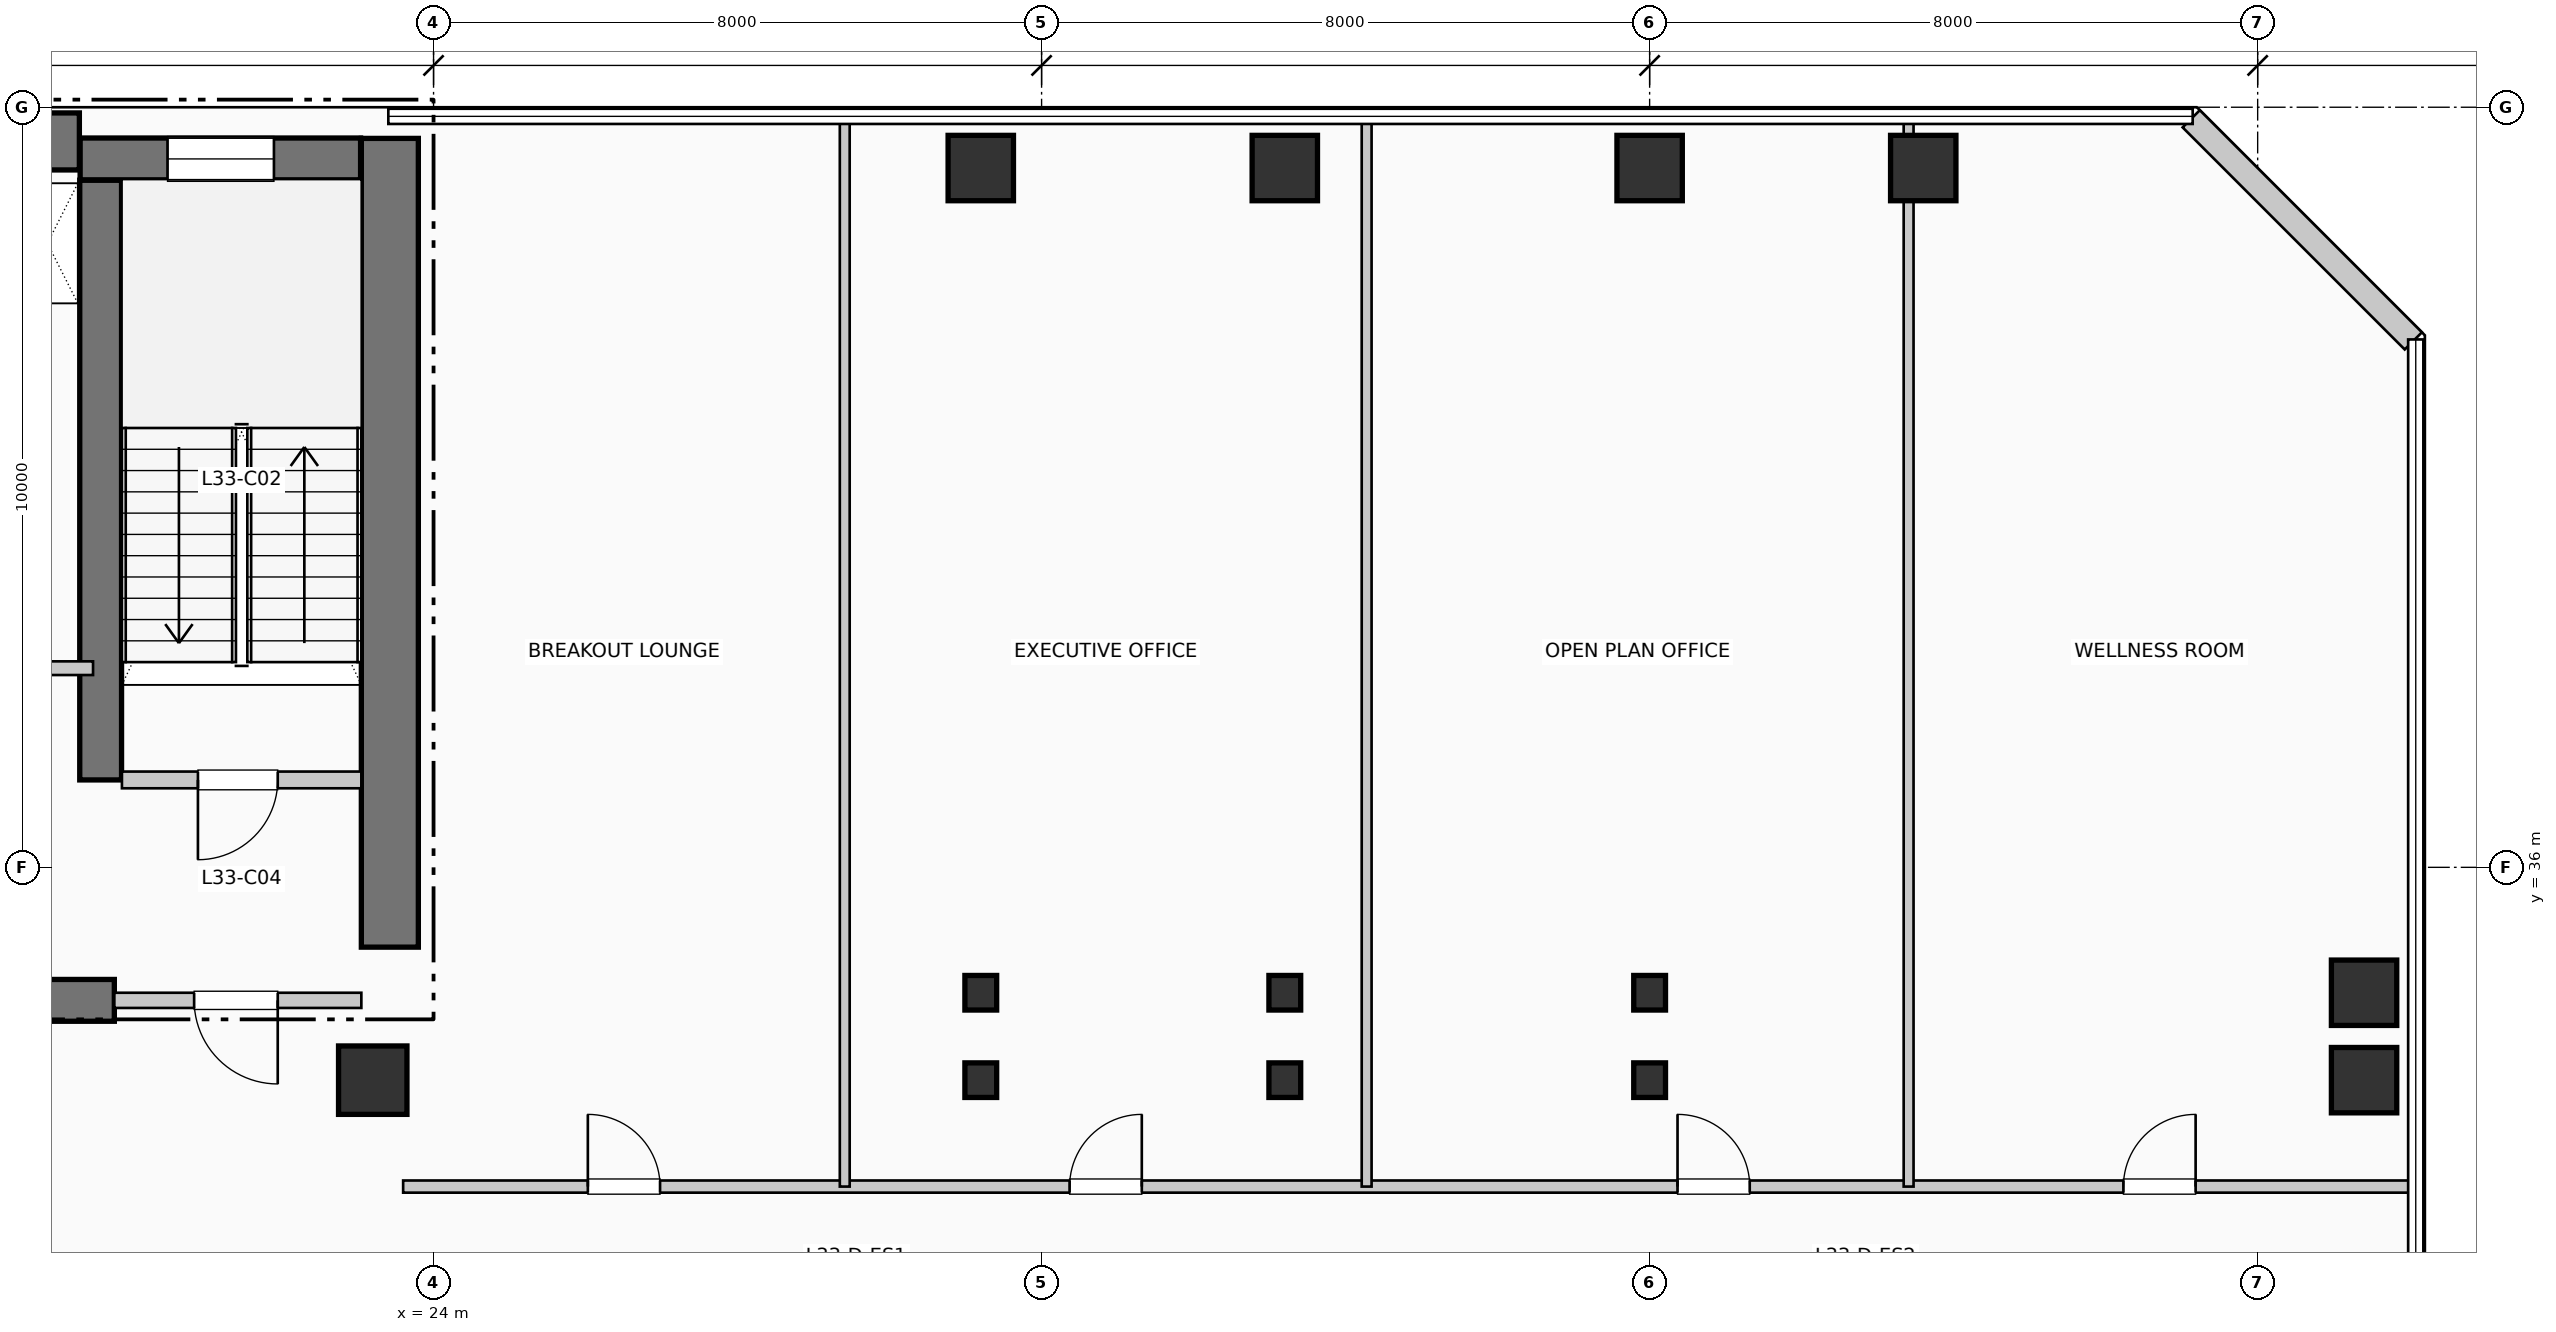
"""IFC4 building model, lengths in metres.
Left out: names, types, materials, properties, quantities, classifications, styles, units other than length and angle.
Written with IfcOpenShell. Run it as: python <this file> out.ifc"""

import sys

from ifc_helpers import new_model, si_unit, direction, frame, frame_2d, origin, origin_2d, place, context, subcontext, project, spatial, rectangle, i_section, extrude, element, fill, save


model = new_model("IFC4")
c1 = context("Model", 3, precision=1e-05, world=origin(), true_north=direction((0.0, 1.0)))
c2 = subcontext(c1, "Body", "Model", "MODEL_VIEW")
j1 = project(units=[si_unit("LENGTHUNIT", "METRE"), si_unit("PLANEANGLEUNIT", "RADIAN")], contexts=[c1])
p1 = place(None, origin())
s1 = spatial("IfcSite", under=j1, at=p1, CompositionType="ELEMENT")
p2 = place(p1, origin())
s2 = spatial("IfcBuilding", under=s1, at=p2, CompositionType="ELEMENT")
p3 = place(p2, frame((0.0, 0.0, 138.93)))
s3 = spatial("IfcBuildingStorey", under=s2, at=p3, CompositionType="ELEMENT", Elevation=138.93)
p4 = place(p3, frame((5.36, 45.55, 0.0), z_axis=(0.0, 0.0, 1.0), x_axis=(1.0, 0.0, 0.0)))
e1 = element("IfcWall", 1, at=p4, inside=s3, PredefinedType="SHEAR", context=c2, shape_type="SweptSolid", body=[
    extrude(rectangle(XDim=13.98, YDim=0.75, at=frame_2d((6.99, 0.0))), origin(), (0.0, 0.0, 1.0), 3.96),
])
p5 = place(p3, frame((23.425, 34.95, 0.0), z_axis=(0.0, 0.0, 1.0), x_axis=(0.0, 1.0, 0.0)))
e2 = element("IfcWall", 2, at=p5, inside=s3, PredefinedType="SHEAR", context=c2, shape_type="SweptSolid", body=[
    extrude(rectangle(XDim=10.64, YDim=0.75, at=frame_2d((5.32, 0.0))), origin(), (0.0, 0.0, 1.0), 3.96),
])
p6 = place(p3, frame((13.68, 34.25, 0.0), z_axis=(0.0, 0.0, 1.0), x_axis=(1.0, 0.0, 0.0)))
e3 = element("IfcWall", 3, at=p6, inside=s3, PredefinedType="SHEAR", context=c2, shape_type="SweptSolid", body=[
    extrude(rectangle(XDim=6.12, YDim=0.55, at=frame_2d((3.06, 0.0))), origin(), (0.0, 0.0, 1.0), 3.96),
])
p7 = place(p3, frame((19.62, 37.15, 0.0), z_axis=(0.0, 0.0, 1.0), x_axis=(0.0, 1.0, 0.0)))
e4 = element("IfcWall", 4, at=p7, inside=s3, PredefinedType="SHEAR", context=c2, shape_type="SweptSolid", body=[
    extrude(rectangle(XDim=7.89, YDim=0.55, at=frame_2d((3.945, 0.0))), origin(), (0.0, 0.0, 1.0), 3.96),
])
p8 = place(p3, frame((19.35, 45.32, 0.0), z_axis=(0.0, 0.0, 1.0), x_axis=(1.0, 0.0, 0.0)))
e5 = element("IfcWall", 5, at=p8, inside=s3, PredefinedType="SHEAR", context=c2, shape_type="SweptSolid", body=[
    extrude(rectangle(XDim=3.69, YDim=0.55, at=frame_2d((1.845, 0.0))), origin(), (0.0, 0.0, 1.0), 3.96),
])
p9 = place(p8, frame((1.15, 0.0, 1.05)))
e6 = element("IfcOpeningElement", 6, at=p9, cuts=e5, PredefinedType="OPENING", context=c2, shape_type="SweptSolid", body=[
    extrude(rectangle(XDim=1.4, YDim=1.8, at=frame_2d((0.7, 0.9))), frame((0.0, 0.285, 0.0), z_axis=(0.0, -1.0, 0.0), x_axis=(1.0, 0.0, 0.0)), (0.0, 0.0, 1.0), 0.57),
])
p10 = place(p3, frame((23.2, 33.2, 0.0), z_axis=(0.0, 0.0, 1.0), x_axis=(1.0, 0.0, 0.0)))
e7 = element("IfcColumn", 7, at=p10, inside=s3, PredefinedType="COLUMN", context=c2, shape_type="SweptSolid", body=[
    extrude(rectangle(XDim=0.9, YDim=0.9, at=origin_2d()), origin(), (0.0, 0.0, 1.0), 3.96),
])
for number, where, z_axis, x_axis in (
    (8, (31.2, 33.2, 0.0), (0.0, 0.0, 1.0), (1.0, 0.0, 0.0)),
    (9, (31.2, 34.35, 0.0), (0.0, 0.0, 1.0), (1.0, 0.0, 0.0)),
):
    element("IfcColumn", number, at=place(p3, frame(where, z_axis=z_axis, x_axis=x_axis)), inside=s3, PredefinedType="COLUMN", context=c2, shape_type="SweptSolid", body=[
        extrude(i_section(OverallWidth=0.418, OverallDepth=0.455, WebThickness=0.032, FlangeThickness=0.051, at=origin_2d()), origin(), (0.0, 0.0, 1.0), 3.96),
    ])
p11 = place(p3, frame((31.2, 45.2, 0.0), z_axis=(0.0, 0.0, 1.0), x_axis=(1.0, 0.0, 0.0)))
e10 = element("IfcColumn", 10, at=p11, inside=s3, PredefinedType="COLUMN", context=c2, shape_type="SweptSolid", body=[
    extrude(rectangle(XDim=0.86, YDim=0.86, at=origin_2d()), origin(), (0.0, 0.0, 1.0), 3.96),
])
for number, where, z_axis, x_axis in (
    (11, (35.2, 33.2, 0.0), (0.0, 0.0, 1.0), (1.0, 0.0, 0.0)),
    (12, (35.2, 34.35, 0.0), (0.0, 0.0, 1.0), (1.0, 0.0, 0.0)),
):
    element("IfcColumn", number, at=place(p3, frame(where, z_axis=z_axis, x_axis=x_axis)), inside=s3, PredefinedType="COLUMN", context=c2, shape_type="SweptSolid", body=[
        extrude(i_section(OverallWidth=0.418, OverallDepth=0.455, WebThickness=0.032, FlangeThickness=0.051, at=origin_2d()), origin(), (0.0, 0.0, 1.0), 3.96),
    ])
p12 = place(p3, frame((35.2, 45.2, 0.0), z_axis=(0.0, 0.0, 1.0), x_axis=(1.0, 0.0, 0.0)))
e13 = element("IfcColumn", 13, at=p12, inside=s3, PredefinedType="COLUMN", context=c2, shape_type="SweptSolid", body=[
    extrude(rectangle(XDim=0.86, YDim=0.86, at=origin_2d()), origin(), (0.0, 0.0, 1.0), 3.96),
])
for number, where, z_axis, x_axis in (
    (14, (40.0, 33.2, 0.0), (0.0, 0.0, 1.0), (1.0, 0.0, 0.0)),
    (15, (40.0, 34.35, 0.0), (0.0, 0.0, 1.0), (1.0, 0.0, 0.0)),
):
    element("IfcColumn", number, at=place(p3, frame(where, z_axis=z_axis, x_axis=x_axis)), inside=s3, PredefinedType="COLUMN", context=c2, shape_type="SweptSolid", body=[
        extrude(i_section(OverallWidth=0.418, OverallDepth=0.455, WebThickness=0.032, FlangeThickness=0.051, at=origin_2d()), origin(), (0.0, 0.0, 1.0), 3.96),
    ])
for number, where, z_axis, x_axis in (
    (16, (40.0, 45.2, 0.0), (0.0, 0.0, 1.0), (1.0, 0.0, 0.0)),
    (17, (43.6, 45.2, 0.0), (0.0, 0.0, 1.0), (1.0, 0.0, 0.0)),
    (18, (49.4, 33.2, 0.0), (0.0, 0.0, 1.0), (1.0, 0.0, 0.0)),
    (19, (49.4, 34.35, 0.0), (0.0, 0.0, 1.0), (1.0, 0.0, 0.0)),
):
    element("IfcColumn", number, at=place(p3, frame(where, z_axis=z_axis, x_axis=x_axis)), inside=s3, PredefinedType="COLUMN", context=c2, shape_type="SweptSolid", body=[
        extrude(rectangle(XDim=0.86, YDim=0.86, at=origin_2d()), origin(), (0.0, 0.0, 1.0), 3.96),
    ])
p13 = place(p3, frame((50.048, 42.926, 0.0), z_axis=(0.0, 0.0, 1.0), x_axis=(-0.707136318428, 0.707077242712, 0.0)))
e20 = element("IfcWall", 20, at=p13, inside=s3, PredefinedType="SOLIDWALL", context=c2, shape_type="SweptSolid", body=[
    extrude(rectangle(XDim=4.133, YDim=0.32, at=frame_2d((2.066, 0.0))), origin(), (0.0, 0.0, 1.0), 3.71),
])
p14 = place(p3, frame((19.9, 37.15, 0.0), z_axis=(0.0, 0.0, 1.0), x_axis=(1.0, 0.0, 0.0)))
e21 = element("IfcWall", 21, at=p14, inside=s3, PredefinedType="PARTITIONING", context=c2, shape_type="SweptSolid", body=[
    extrude(rectangle(XDim=3.15, YDim=0.22, at=frame_2d((1.575, 0.0))), origin(), (0.0, 0.0, 1.0), 3.71),
])
p15 = place(p14, frame((2.05, 0.0, 0.0), z_axis=(0.0, 0.0, 1.0), x_axis=(-1.0, 0.0, 0.0)))
e22 = element("IfcOpeningElement", 22, at=p15, cuts=e21, PredefinedType="OPENING", context=c2, shape_type="SweptSolid", body=[
    extrude(rectangle(XDim=1.05, YDim=2.15, at=frame_2d((0.525, 1.075))), frame((0.0, 0.12, 0.0), z_axis=(0.0, -1.0, 0.0), x_axis=(1.0, 0.0, 0.0)), (0.0, 0.0, 1.0), 0.24),
])
p16 = place(p3, frame((19.8, 34.25, 0.0), z_axis=(0.0, 0.0, 1.0), x_axis=(1.0, 0.0, 0.0)))
e23 = element("IfcWall", 23, at=p16, inside=s3, PredefinedType="PARTITIONING", context=c2, shape_type="SweptSolid", body=[
    extrude(rectangle(XDim=3.25, YDim=0.2, at=frame_2d((1.625, 0.0))), origin(), (0.0, 0.0, 1.0), 3.71),
])
p17 = place(p16, frame((2.15, 0.0, 0.0), z_axis=(0.0, 0.0, 1.0), x_axis=(-1.0, 0.0, 0.0)))
e24 = element("IfcOpeningElement", 24, at=p17, cuts=e23, PredefinedType="OPENING", context=c2, shape_type="SweptSolid", body=[
    extrude(rectangle(XDim=1.1, YDim=2.15, at=frame_2d((0.55, 1.075))), frame((0.0, 0.11, 0.0), z_axis=(0.0, -1.0, 0.0), x_axis=(1.0, 0.0, 0.0)), (0.0, 0.0, 1.0), 0.22),
])
p18 = place(p3, frame((17.68, 38.62, 0.0), z_axis=(0.0, 0.0, 1.0), x_axis=(1.0, 0.0, 0.0)))
e25 = element("IfcWall", 25, at=p18, inside=s3, PredefinedType="PARTITIONING", context=c2, shape_type="SweptSolid", body=[
    extrude(rectangle(XDim=1.84, YDim=0.18, at=frame_2d((0.92, 0.0))), origin(), (0.0, 0.0, 1.0), 3.71),
])
p19 = place(p18, frame((0.24, 0.0, 0.0)))
e26 = element("IfcOpeningElement", 26, at=p19, cuts=e25, PredefinedType="OPENING", context=c2, shape_type="SweptSolid", body=[
    extrude(rectangle(XDim=0.92, YDim=2.1, at=frame_2d((0.46, 1.05))), frame((0.0, 0.1, 0.0), z_axis=(0.0, -1.0, 0.0), x_axis=(1.0, 0.0, 0.0)), (0.0, 0.0, 1.0), 0.2),
])
p20 = place(p3, frame((23.6, 31.8, 0.0), z_axis=(0.0, 0.0, 1.0), x_axis=(1.0, 0.0, 0.0)))
e27 = element("IfcWall", 27, at=p20, inside=s3, PredefinedType="PARTITIONING", context=c2, shape_type="SweptSolid", body=[
    extrude(rectangle(XDim=26.41, YDim=0.16, at=frame_2d((13.205, 0.0))), origin(), (0.0, 0.0, 1.0), 3.71),
])
p21 = place(p20, frame((2.43, 0.0, 0.0)))
e28 = element("IfcOpeningElement", 28, at=p21, cuts=e27, PredefinedType="OPENING", context=c2, shape_type="SweptSolid", body=[
    extrude(rectangle(XDim=0.95, YDim=2.15, at=frame_2d((0.475, 1.075))), frame((0.0, 0.09, 0.0), z_axis=(0.0, -1.0, 0.0), x_axis=(1.0, 0.0, 0.0)), (0.0, 0.0, 1.0), 0.18),
])
p22 = place(p20, frame((8.769, 0.0, 0.0)))
e29 = element("IfcOpeningElement", 29, at=p22, cuts=e27, PredefinedType="OPENING", context=c2, shape_type="SweptSolid", body=[
    extrude(rectangle(XDim=0.95, YDim=2.15, at=frame_2d((0.475, 1.075))), frame((0.0, 0.09, 0.0), z_axis=(0.0, -1.0, 0.0), x_axis=(1.0, 0.0, 0.0)), (0.0, 0.0, 1.0), 0.18),
])
p23 = place(p20, frame((16.767, 0.0, 0.0)))
e30 = element("IfcOpeningElement", 30, at=p23, cuts=e27, PredefinedType="OPENING", context=c2, shape_type="SweptSolid", body=[
    extrude(rectangle(XDim=0.95, YDim=2.15, at=frame_2d((0.475, 1.075))), frame((0.0, 0.09, 0.0), z_axis=(0.0, -1.0, 0.0), x_axis=(1.0, 0.0, 0.0)), (0.0, 0.0, 1.0), 0.18),
])
p24 = place(p20, frame((22.634, 0.0, 0.0)))
e31 = element("IfcOpeningElement", 31, at=p24, cuts=e27, PredefinedType="OPENING", context=c2, shape_type="SweptSolid", body=[
    extrude(rectangle(XDim=0.95, YDim=2.15, at=frame_2d((0.475, 1.075))), frame((0.0, 0.09, 0.0), z_axis=(0.0, -1.0, 0.0), x_axis=(1.0, 0.0, 0.0)), (0.0, 0.0, 1.0), 0.18),
])
for number, where, z_axis, x_axis in (
    (32, (29.41, 31.8, 0.0), (0.0, 0.0, 1.0), (0.0, 1.0, 0.0)),
    (33, (36.277, 31.8, 0.0), (0.0, 0.0, 1.0), (0.0, 1.0, 0.0)),
    (34, (43.407, 31.8, 0.0), (0.0, 0.0, 1.0), (0.0, 1.0, 0.0)),
):
    element("IfcWall", number, at=place(p3, frame(where, z_axis=z_axis, x_axis=x_axis)), inside=s3, PredefinedType="PARTITIONING", context=c2, shape_type="SweptSolid", body=[
        extrude(rectangle(XDim=14.01, YDim=0.13, at=frame_2d((7.005, 0.0))), origin(), (0.0, 0.0, 1.0), 3.71),
    ])
p25 = place(p9, origin())
e35 = element("IfcWindow", 35, at=p25, inside=s3, PartitioningType="SINGLE_PANEL", PredefinedType="WINDOW", context=c2, shape_type="SweptSolid", body=[
    extrude(rectangle(XDim=1.4, YDim=1.8, at=frame_2d((0.7, 0.9))), frame((0.0, 0.03, 0.0), z_axis=(0.0, -1.0, 0.0), x_axis=(1.0, 0.0, 0.0)), (0.0, 0.0, 1.0), 0.06),
])
fill(e6, e35)
p26 = place(p15, origin())
e36 = element("IfcDoor", 36, at=p26, inside=s3, OperationType="SINGLE_SWING_LEFT", PredefinedType="DOOR", context=c2, shape_type="SweptSolid", body=[
    extrude(rectangle(XDim=1.05, YDim=2.15, at=frame_2d((0.525, 1.075))), frame((0.0, 0.025, 0.0), z_axis=(0.0, -1.0, 0.0), x_axis=(1.0, 0.0, 0.0)), (0.0, 0.0, 1.0), 0.05),
])
fill(e22, e36)
p27 = place(p17, origin())
e37 = element("IfcDoor", 37, at=p27, inside=s3, OperationType="SINGLE_SWING_RIGHT", PredefinedType="DOOR", context=c2, shape_type="SweptSolid", body=[
    extrude(rectangle(XDim=1.1, YDim=2.15, at=frame_2d((0.55, 1.075))), frame((0.0, 0.025, 0.0), z_axis=(0.0, -1.0, 0.0), x_axis=(1.0, 0.0, 0.0)), (0.0, 0.0, 1.0), 0.05),
])
fill(e24, e37)
p28 = place(p21, origin())
e38 = element("IfcDoor", 38, at=p28, inside=s3, OperationType="SINGLE_SWING_LEFT", PredefinedType="DOOR", context=c2, shape_type="SweptSolid", body=[
    extrude(rectangle(XDim=0.95, YDim=2.15, at=frame_2d((0.475, 1.075))), frame((0.0, 0.025, 0.0), z_axis=(0.0, -1.0, 0.0), x_axis=(1.0, 0.0, 0.0)), (0.0, 0.0, 1.0), 0.05),
])
fill(e28, e38)
p29 = place(p22, origin())
e39 = element("IfcDoor", 39, at=p29, inside=s3, OperationType="SINGLE_SWING_RIGHT", PredefinedType="DOOR", context=c2, shape_type="SweptSolid", body=[
    extrude(rectangle(XDim=0.95, YDim=2.15, at=frame_2d((0.475, 1.075))), frame((0.0, 0.025, 0.0), z_axis=(0.0, -1.0, 0.0), x_axis=(1.0, 0.0, 0.0)), (0.0, 0.0, 1.0), 0.05),
])
fill(e29, e39)
p30 = place(p23, origin())
e40 = element("IfcDoor", 40, at=p30, inside=s3, OperationType="SINGLE_SWING_LEFT", PredefinedType="DOOR", context=c2, shape_type="SweptSolid", body=[
    extrude(rectangle(XDim=0.95, YDim=2.15, at=frame_2d((0.475, 1.075))), frame((0.0, 0.025, 0.0), z_axis=(0.0, -1.0, 0.0), x_axis=(1.0, 0.0, 0.0)), (0.0, 0.0, 1.0), 0.05),
])
fill(e30, e40)
p31 = place(p24, origin())
e41 = element("IfcDoor", 41, at=p31, inside=s3, OperationType="SINGLE_SWING_RIGHT", PredefinedType="DOOR", context=c2, shape_type="SweptSolid", body=[
    extrude(rectangle(XDim=0.95, YDim=2.15, at=frame_2d((0.475, 1.075))), frame((0.0, 0.025, 0.0), z_axis=(0.0, -1.0, 0.0), x_axis=(1.0, 0.0, 0.0)), (0.0, 0.0, 1.0), 0.05),
])
fill(e31, e41)
save(model, sys.argv[1])
